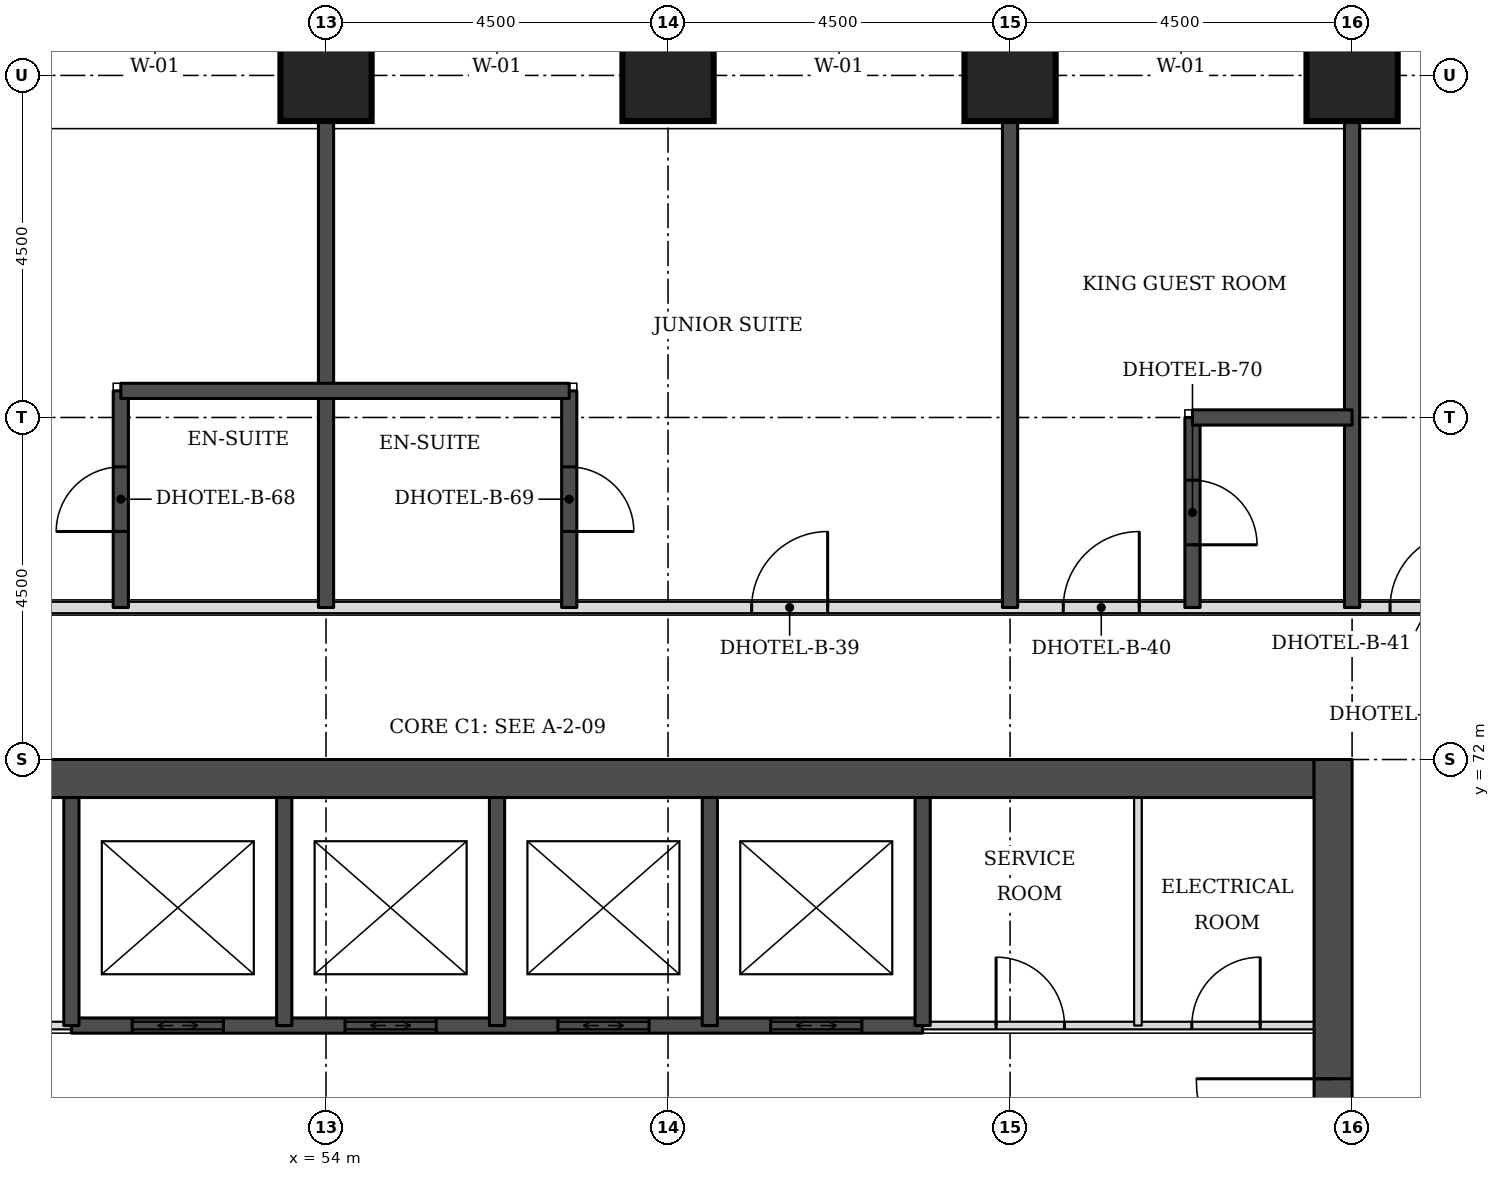
"""IFC4 building model, lengths in metres.
Left out: names, types, materials, properties, quantities, classifications, styles, units other than length and angle.
Written with IfcOpenShell. Run it as: python <this file> out.ifc"""

import sys

from ifc_helpers import new_model, si_unit, direction, frame, frame_2d, origin, origin_2d, place, context, subcontext, project, spatial, rectangle, extrude, element, fill, save


model = new_model("IFC4")
c1 = context("Model", 3, precision=1e-05, world=origin(), true_north=direction((0.0, 1.0)))
c2 = subcontext(c1, "Body", "Model", "MODEL_VIEW")
j1 = project(units=[si_unit("LENGTHUNIT", "METRE"), si_unit("PLANEANGLEUNIT", "RADIAN")], contexts=[c1])
p1 = place(None, origin())
s1 = spatial("IfcSite", under=j1, at=p1, CompositionType="ELEMENT")
p2 = place(p1, origin())
s2 = spatial("IfcBuilding", under=s1, at=p2, CompositionType="ELEMENT")
p3 = place(p2, frame((0.0, 0.0, 29.7)))
s3 = spatial("IfcBuildingStorey", under=s2, at=p3, CompositionType="ELEMENT", Elevation=29.7)
for number, where, z_axis, x_axis in (
    (1, (54.0, 81.0, 0.0), (0.0, 0.0, 1.0), (1.0, 0.0, 0.0)),
    (2, (58.5, 81.0, 0.0), (0.0, 0.0, 1.0), (1.0, 0.0, 0.0)),
    (3, (63.0, 81.0, 0.0), (0.0, 0.0, 1.0), (1.0, 0.0, 0.0)),
    (4, (67.5, 81.0, 0.0), (0.0, 0.0, 1.0), (1.0, 0.0, 0.0)),
):
    element("IfcColumn", number, at=place(p3, frame(where, z_axis=z_axis, x_axis=x_axis)), inside=s3, PredefinedType="COLUMN", context=c2, shape_type="SweptSolid", body=[
        extrude(rectangle(XDim=1.2, YDim=1.2, at=origin_2d()), origin(), (0.0, 0.0, 1.0), 3.3),
    ])
p4 = place(p3, frame((45.5, 71.75, 0.0), z_axis=(0.0, 0.0, 1.0), x_axis=(1.0, 0.0, 0.0)))
e5 = element("IfcWall", 5, at=p4, inside=s3, PredefinedType="SHEAR", context=c2, shape_type="SweptSolid", body=[
    extrude(rectangle(XDim=21.5, YDim=0.5, at=frame_2d((10.75, 0.0))), origin(), (0.0, 0.0, 1.0), 3.3),
])
p5 = place(p3, frame((67.25, 49.5, 0.0), z_axis=(0.0, 0.0, 1.0), x_axis=(0.0, 1.0, 0.0)))
e6 = element("IfcWall", 6, at=p5, inside=s3, PredefinedType="SHEAR", context=c2, shape_type="SweptSolid", body=[
    extrude(rectangle(XDim=22.5, YDim=0.5, at=frame_2d((11.25, 0.0))), origin(), (0.0, 0.0, 1.0), 3.3),
])
p6 = place(p5, frame((4.2, 0.0, 0.0)))
e7 = element("IfcOpeningElement", 7, at=p6, cuts=e6, PredefinedType="OPENING", context=c2, shape_type="SweptSolid", body=[
    extrude(rectangle(XDim=1.8, YDim=2.1, at=frame_2d((0.9, 1.05))), frame((0.0, 0.26, 0.0), z_axis=(0.0, -1.0, 0.0), x_axis=(1.0, 0.0, 0.0)), (0.0, 0.0, 1.0), 0.52),
])
p7 = place(p5, frame((6.9, 0.0, 0.0)))
e8 = element("IfcOpeningElement", 8, at=p7, cuts=e6, PredefinedType="OPENING", context=c2, shape_type="SweptSolid", body=[
    extrude(rectangle(XDim=1.1, YDim=2.1, at=frame_2d((0.55, 1.05))), frame((0.0, 0.26, 0.0), z_axis=(0.0, -1.0, 0.0), x_axis=(1.0, 0.0, 0.0)), (0.0, 0.0, 1.0), 0.52),
])
p8 = place(p5, frame((13.6, 0.0, 0.0)))
e9 = element("IfcOpeningElement", 9, at=p8, cuts=e6, PredefinedType="OPENING", context=c2, shape_type="SweptSolid", body=[
    extrude(rectangle(XDim=1.1, YDim=2.1, at=frame_2d((0.55, 1.05))), frame((0.0, 0.26, 0.0), z_axis=(0.0, -1.0, 0.0), x_axis=(1.0, 0.0, 0.0)), (0.0, 0.0, 1.0), 0.52),
])
p9 = place(p5, frame((16.5, 0.0, 0.0)))
e10 = element("IfcOpeningElement", 10, at=p9, cuts=e6, PredefinedType="OPENING", context=c2, shape_type="SweptSolid", body=[
    extrude(rectangle(XDim=1.8, YDim=2.1, at=frame_2d((0.9, 1.05))), frame((0.0, 0.26, 0.0), z_axis=(0.0, -1.0, 0.0), x_axis=(1.0, 0.0, 0.0)), (0.0, 0.0, 1.0), 0.52),
])
p10 = place(p3, frame((43.0, 74.0, 0.0), z_axis=(0.0, 0.0, 1.0), x_axis=(1.0, 0.0, 0.0)))
e11 = element("IfcWall", 11, at=p10, inside=s3, PredefinedType="PARTITIONING", context=c2, shape_type="SweptSolid", body=[
    extrude(rectangle(XDim=26.5, YDim=0.15, at=frame_2d((13.25, 0.0))), origin(), (0.0, 0.0, 1.0), 3.08),
])
p11 = place(p10, frame((4.65, 0.0, 0.0)))
e12 = element("IfcOpeningElement", 12, at=p11, cuts=e11, PredefinedType="OPENING", context=c2, shape_type="SweptSolid", body=[
    extrude(rectangle(XDim=1.0, YDim=2.1, at=frame_2d((0.5, 1.05))), frame((0.0, 0.085, 0.0), z_axis=(0.0, -1.0, 0.0), x_axis=(1.0, 0.0, 0.0)), (0.0, 0.0, 1.0), 0.17),
])
p12 = place(p10, frame((16.6, 0.0, 0.0)))
e13 = element("IfcOpeningElement", 13, at=p12, cuts=e11, PredefinedType="OPENING", context=c2, shape_type="SweptSolid", body=[
    extrude(rectangle(XDim=1.0, YDim=2.1, at=frame_2d((0.5, 1.05))), frame((0.0, 0.085, 0.0), z_axis=(0.0, -1.0, 0.0), x_axis=(1.0, 0.0, 0.0)), (0.0, 0.0, 1.0), 0.17),
])
p13 = place(p10, frame((20.7, 0.0, 0.0)))
e14 = element("IfcOpeningElement", 14, at=p13, cuts=e11, PredefinedType="OPENING", context=c2, shape_type="SweptSolid", body=[
    extrude(rectangle(XDim=1.0, YDim=2.1, at=frame_2d((0.5, 1.05))), frame((0.0, 0.085, 0.0), z_axis=(0.0, -1.0, 0.0), x_axis=(1.0, 0.0, 0.0)), (0.0, 0.0, 1.0), 0.17),
])
p14 = place(p10, frame((0.5, 0.0, 0.0)))
e15 = element("IfcOpeningElement", 15, at=p14, cuts=e11, PredefinedType="OPENING", context=c2, shape_type="SweptSolid", body=[
    extrude(rectangle(XDim=1.0, YDim=2.1, at=frame_2d((0.5, 1.05))), frame((0.0, 0.085, 0.0), z_axis=(0.0, -1.0, 0.0), x_axis=(1.0, 0.0, 0.0)), (0.0, 0.0, 1.0), 0.17),
])
p15 = place(p10, frame((25.0, 0.0, 0.0)))
e16 = element("IfcOpeningElement", 16, at=p15, cuts=e11, PredefinedType="OPENING", context=c2, shape_type="SweptSolid", body=[
    extrude(rectangle(XDim=1.0, YDim=2.1, at=frame_2d((0.5, 1.05))), frame((0.0, 0.085, 0.0), z_axis=(0.0, -1.0, 0.0), x_axis=(1.0, 0.0, 0.0)), (0.0, 0.0, 1.0), 0.17),
])
p16 = place(p3, frame((51.3, 74.0, 0.0), z_axis=(0.0, 0.0, 1.0), x_axis=(0.0, 1.0, 0.0)))
e17 = element("IfcWall", 17, at=p16, inside=s3, PredefinedType="SOLIDWALL", context=c2, shape_type="SweptSolid", body=[
    extrude(rectangle(XDim=2.85, YDim=0.2, at=frame_2d((1.425, 0.0))), origin(), (0.0, 0.0, 1.0), 3.08),
])
p17 = place(p16, frame((1.0, 0.0, 0.0)))
e18 = element("IfcOpeningElement", 18, at=p17, cuts=e17, PredefinedType="OPENING", context=c2, shape_type="SweptSolid", body=[
    extrude(rectangle(XDim=0.85, YDim=2.1, at=frame_2d((0.425, 1.05))), frame((0.0, 0.11, 0.0), z_axis=(0.0, -1.0, 0.0), x_axis=(1.0, 0.0, 0.0)), (0.0, 0.0, 1.0), 0.22),
])
p18 = place(p3, frame((54.0, 74.0, 0.0), z_axis=(0.0, 0.0, 1.0), x_axis=(0.0, 1.0, 0.0)))
e19 = element("IfcWall", 19, at=p18, inside=s3, PredefinedType="SOLIDWALL", context=c2, shape_type="SweptSolid", body=[
    extrude(rectangle(XDim=6.4, YDim=0.2, at=frame_2d((3.2, 0.0))), origin(), (0.0, 0.0, 1.0), 3.08),
])
p19 = place(p3, frame((57.2, 74.0, 0.0), z_axis=(0.0, 0.0, 1.0), x_axis=(0.0, 1.0, 0.0)))
e20 = element("IfcWall", 20, at=p19, inside=s3, PredefinedType="SOLIDWALL", context=c2, shape_type="SweptSolid", body=[
    extrude(rectangle(XDim=2.85, YDim=0.2, at=frame_2d((1.425, 0.0))), origin(), (0.0, 0.0, 1.0), 3.08),
])
p20 = place(p19, frame((1.0, 0.0, 0.0)))
e21 = element("IfcOpeningElement", 21, at=p20, cuts=e20, PredefinedType="OPENING", context=c2, shape_type="SweptSolid", body=[
    extrude(rectangle(XDim=0.85, YDim=2.1, at=frame_2d((0.425, 1.05))), frame((0.0, 0.11, 0.0), z_axis=(0.0, -1.0, 0.0), x_axis=(1.0, 0.0, 0.0)), (0.0, 0.0, 1.0), 0.22),
])
p21 = place(p3, frame((63.0, 74.0, 0.0), z_axis=(0.0, 0.0, 1.0), x_axis=(0.0, 1.0, 0.0)))
e22 = element("IfcWall", 22, at=p21, inside=s3, PredefinedType="SOLIDWALL", context=c2, shape_type="SweptSolid", body=[
    extrude(rectangle(XDim=6.4, YDim=0.2, at=frame_2d((3.2, 0.0))), origin(), (0.0, 0.0, 1.0), 3.08),
])
p22 = place(p3, frame((65.4, 74.0, 0.0), z_axis=(0.0, 0.0, 1.0), x_axis=(0.0, 1.0, 0.0)))
e23 = element("IfcWall", 23, at=p22, inside=s3, PredefinedType="SOLIDWALL", context=c2, shape_type="SweptSolid", body=[
    extrude(rectangle(XDim=2.5, YDim=0.2, at=frame_2d((1.25, 0.0))), origin(), (0.0, 0.0, 1.0), 3.08),
])
p23 = place(p22, frame((0.825, 0.0, 0.0)))
e24 = element("IfcOpeningElement", 24, at=p23, cuts=e23, PredefinedType="OPENING", context=c2, shape_type="SweptSolid", body=[
    extrude(rectangle(XDim=0.85, YDim=2.1, at=frame_2d((0.425, 1.05))), frame((0.0, 0.11, 0.0), z_axis=(0.0, -1.0, 0.0), x_axis=(1.0, 0.0, 0.0)), (0.0, 0.0, 1.0), 0.22),
])
p24 = place(p3, frame((67.5, 74.0, 0.0), z_axis=(0.0, 0.0, 1.0), x_axis=(0.0, 1.0, 0.0)))
e25 = element("IfcWall", 25, at=p24, inside=s3, PredefinedType="SOLIDWALL", context=c2, shape_type="SweptSolid", body=[
    extrude(rectangle(XDim=6.4, YDim=0.2, at=frame_2d((3.2, 0.0))), origin(), (0.0, 0.0, 1.0), 3.08),
])
p25 = place(p3, frame((65.4, 76.5, 0.0), z_axis=(0.0, 0.0, 1.0), x_axis=(1.0, 0.0, 0.0)))
e26 = element("IfcWall", 26, at=p25, inside=s3, PredefinedType="SOLIDWALL", context=c2, shape_type="SweptSolid", body=[
    extrude(rectangle(XDim=2.1, YDim=0.2, at=frame_2d((1.05, 0.0))), origin(), (0.0, 0.0, 1.0), 3.08),
])
p26 = place(p3, frame((51.3, 76.85, 0.0), z_axis=(0.0, 0.0, 1.0), x_axis=(1.0, 0.0, 0.0)))
e27 = element("IfcWall", 27, at=p26, inside=s3, PredefinedType="SOLIDWALL", context=c2, shape_type="SweptSolid", body=[
    extrude(rectangle(XDim=5.9, YDim=0.2, at=frame_2d((2.95, 0.0))), origin(), (0.0, 0.0, 1.0), 3.08),
])
p27 = place(p3, frame((45.5, 68.5, 0.0), z_axis=(0.0, 0.0, 1.0), x_axis=(1.0, 0.0, 0.0)))
e28 = element("IfcWall", 28, at=p27, inside=s3, PredefinedType="PARTITIONING", context=c2, shape_type="SweptSolid", body=[
    extrude(rectangle(XDim=5.15, YDim=0.1, at=frame_2d((2.575, 0.0))), origin(), (0.0, 0.0, 1.0), 3.08),
])
p28 = place(p27, frame((2.125, 0.0, 0.0)))
e29 = element("IfcOpeningElement", 29, at=p28, cuts=e28, PredefinedType="OPENING", context=c2, shape_type="SweptSolid", body=[
    extrude(rectangle(XDim=0.9, YDim=2.1, at=frame_2d((0.45, 1.05))), frame((0.0, 0.06, 0.0), z_axis=(0.0, -1.0, 0.0), x_axis=(1.0, 0.0, 0.0)), (0.0, 0.0, 1.0), 0.12),
])
p29 = place(p3, frame((61.85, 68.5, 0.0), z_axis=(0.0, 0.0, 1.0), x_axis=(1.0, 0.0, 0.0)))
e30 = element("IfcWall", 30, at=p29, inside=s3, PredefinedType="PARTITIONING", context=c2, shape_type="SweptSolid", body=[
    extrude(rectangle(XDim=5.15, YDim=0.1, at=frame_2d((2.575, 0.0))), origin(), (0.0, 0.0, 1.0), 3.08),
])
p30 = place(p29, frame((3.541, 0.0, 0.0)))
e31 = element("IfcOpeningElement", 31, at=p30, cuts=e30, PredefinedType="OPENING", context=c2, shape_type="SweptSolid", body=[
    extrude(rectangle(XDim=0.9, YDim=2.1, at=frame_2d((0.45, 1.05))), frame((0.0, 0.06, 0.0), z_axis=(0.0, -1.0, 0.0), x_axis=(1.0, 0.0, 0.0)), (0.0, 0.0, 1.0), 0.12),
])
p31 = place(p29, frame((0.966, 0.0, 0.0)))
e32 = element("IfcOpeningElement", 32, at=p31, cuts=e30, PredefinedType="OPENING", context=c2, shape_type="SweptSolid", body=[
    extrude(rectangle(XDim=0.9, YDim=2.1, at=frame_2d((0.45, 1.05))), frame((0.0, 0.06, 0.0), z_axis=(0.0, -1.0, 0.0), x_axis=(1.0, 0.0, 0.0)), (0.0, 0.0, 1.0), 0.12),
])
p32 = place(p3, frame((50.65, 68.5, 0.0), z_axis=(0.0, 0.0, 1.0), x_axis=(1.0, 0.0, 0.0)))
e33 = element("IfcWall", 33, at=p32, inside=s3, PredefinedType="SOLIDWALL", context=c2, shape_type="SweptSolid", body=[
    extrude(rectangle(XDim=11.2, YDim=0.2, at=frame_2d((5.6, 0.0))), origin(), (0.0, 0.0, 1.0), 3.08),
])
p33 = place(p32, frame((0.8, 0.0, 0.0)))
e34 = element("IfcOpeningElement", 34, at=p33, cuts=e33, PredefinedType="OPENING", context=c2, shape_type="SweptSolid", body=[
    extrude(rectangle(XDim=1.2, YDim=2.1, at=frame_2d((0.6, 1.05))), frame((0.0, 0.11, 0.0), z_axis=(0.0, -1.0, 0.0), x_axis=(1.0, 0.0, 0.0)), (0.0, 0.0, 1.0), 0.22),
])
p34 = place(p32, frame((3.6, 0.0, 0.0)))
e35 = element("IfcOpeningElement", 35, at=p34, cuts=e33, PredefinedType="OPENING", context=c2, shape_type="SweptSolid", body=[
    extrude(rectangle(XDim=1.2, YDim=2.1, at=frame_2d((0.6, 1.05))), frame((0.0, 0.11, 0.0), z_axis=(0.0, -1.0, 0.0), x_axis=(1.0, 0.0, 0.0)), (0.0, 0.0, 1.0), 0.22),
])
p35 = place(p32, frame((6.4, 0.0, 0.0)))
e36 = element("IfcOpeningElement", 36, at=p35, cuts=e33, PredefinedType="OPENING", context=c2, shape_type="SweptSolid", body=[
    extrude(rectangle(XDim=1.2, YDim=2.1, at=frame_2d((0.6, 1.05))), frame((0.0, 0.11, 0.0), z_axis=(0.0, -1.0, 0.0), x_axis=(1.0, 0.0, 0.0)), (0.0, 0.0, 1.0), 0.22),
])
p36 = place(p32, frame((9.2, 0.0, 0.0)))
e37 = element("IfcOpeningElement", 37, at=p36, cuts=e33, PredefinedType="OPENING", context=c2, shape_type="SweptSolid", body=[
    extrude(rectangle(XDim=1.2, YDim=2.1, at=frame_2d((0.6, 1.05))), frame((0.0, 0.11, 0.0), z_axis=(0.0, -1.0, 0.0), x_axis=(1.0, 0.0, 0.0)), (0.0, 0.0, 1.0), 0.22),
])
for number, where, z_axis, x_axis in (
    (38, (50.65, 68.5, 0.0), (0.0, 0.0, 1.0), (0.0, 1.0, 0.0)),
    (39, (53.45, 68.5, 0.0), (0.0, 0.0, 1.0), (0.0, 1.0, 0.0)),
    (40, (56.25, 68.5, 0.0), (0.0, 0.0, 1.0), (0.0, 1.0, 0.0)),
    (41, (59.05, 68.5, 0.0), (0.0, 0.0, 1.0), (0.0, 1.0, 0.0)),
    (42, (61.85, 68.5, 0.0), (0.0, 0.0, 1.0), (0.0, 1.0, 0.0)),
):
    element("IfcWall", number, at=place(p3, frame(where, z_axis=z_axis, x_axis=x_axis)), inside=s3, PredefinedType="SOLIDWALL", context=c2, shape_type="SweptSolid", body=[
        extrude(rectangle(XDim=3.0, YDim=0.2, at=frame_2d((1.5, 0.0))), origin(), (0.0, 0.0, 1.0), 3.08),
    ])
p37 = place(p3, frame((64.683, 68.5, 0.0), z_axis=(0.0, 0.0, 1.0), x_axis=(0.0, 1.0, 0.0)))
e43 = element("IfcWall", 43, at=p37, inside=s3, PredefinedType="PARTITIONING", context=c2, shape_type="SweptSolid", body=[
    extrude(rectangle(XDim=3.0, YDim=0.1, at=frame_2d((1.5, 0.0))), origin(), (0.0, 0.0, 1.0), 3.08),
])
p38 = place(p17, origin())
e44 = element("IfcDoor", 44, at=p38, inside=s3, OperationType="SINGLE_SWING_LEFT", PredefinedType="DOOR", context=c2, shape_type="SweptSolid", body=[
    extrude(rectangle(XDim=0.85, YDim=2.1, at=frame_2d((0.425, 1.05))), frame((0.0, 0.025, 0.0), z_axis=(0.0, -1.0, 0.0), x_axis=(1.0, 0.0, 0.0)), (0.0, 0.0, 1.0), 0.05),
])
fill(e18, e44)
p39 = place(p12, origin())
e45 = element("IfcDoor", 45, at=p39, inside=s3, OperationType="SINGLE_SWING_RIGHT", PredefinedType="DOOR", context=c2, shape_type="SweptSolid", body=[
    extrude(rectangle(XDim=1.0, YDim=2.1, at=frame_2d((0.5, 1.05))), frame((0.0, 0.025, 0.0), z_axis=(0.0, -1.0, 0.0), x_axis=(1.0, 0.0, 0.0)), (0.0, 0.0, 1.0), 0.05),
])
fill(e13, e45)
p40 = place(p20, frame((0.85, 0.0, 0.0), z_axis=(0.0, 0.0, 1.0), x_axis=(-1.0, 0.0, 0.0)))
e46 = element("IfcDoor", 46, at=p40, inside=s3, OperationType="SINGLE_SWING_RIGHT", PredefinedType="DOOR", context=c2, shape_type="SweptSolid", body=[
    extrude(rectangle(XDim=0.85, YDim=2.1, at=frame_2d((0.425, 1.05))), frame((0.0, 0.025, 0.0), z_axis=(0.0, -1.0, 0.0), x_axis=(1.0, 0.0, 0.0)), (0.0, 0.0, 1.0), 0.05),
])
fill(e21, e46)
p41 = place(p13, origin())
e47 = element("IfcDoor", 47, at=p41, inside=s3, OperationType="SINGLE_SWING_RIGHT", PredefinedType="DOOR", context=c2, shape_type="SweptSolid", body=[
    extrude(rectangle(XDim=1.0, YDim=2.1, at=frame_2d((0.5, 1.05))), frame((0.0, 0.025, 0.0), z_axis=(0.0, -1.0, 0.0), x_axis=(1.0, 0.0, 0.0)), (0.0, 0.0, 1.0), 0.05),
])
fill(e14, e47)
p42 = place(p23, frame((0.85, 0.0, 0.0), z_axis=(0.0, 0.0, 1.0), x_axis=(-1.0, 0.0, 0.0)))
e48 = element("IfcDoor", 48, at=p42, inside=s3, OperationType="SINGLE_SWING_RIGHT", PredefinedType="DOOR", context=c2, shape_type="SweptSolid", body=[
    extrude(rectangle(XDim=0.85, YDim=2.1, at=frame_2d((0.425, 1.05))), frame((0.0, 0.025, 0.0), z_axis=(0.0, -1.0, 0.0), x_axis=(1.0, 0.0, 0.0)), (0.0, 0.0, 1.0), 0.05),
])
fill(e24, e48)
p43 = place(p15, origin())
e49 = element("IfcDoor", 49, at=p43, inside=s3, OperationType="SINGLE_SWING_RIGHT", PredefinedType="DOOR", context=c2, shape_type="SweptSolid", body=[
    extrude(rectangle(XDim=1.0, YDim=2.1, at=frame_2d((0.5, 1.05))), frame((0.0, 0.025, 0.0), z_axis=(0.0, -1.0, 0.0), x_axis=(1.0, 0.0, 0.0)), (0.0, 0.0, 1.0), 0.05),
])
fill(e16, e49)
p44 = place(p33, origin())
e50 = element("IfcDoor", 50, at=p44, inside=s3, OperationType="DOUBLE_DOOR_SLIDING", PredefinedType="DOOR", context=c2, shape_type="SweptSolid", body=[
    extrude(rectangle(XDim=1.2, YDim=2.1, at=frame_2d((0.6, 1.05))), frame((0.0, 0.025, 0.0), z_axis=(0.0, -1.0, 0.0), x_axis=(1.0, 0.0, 0.0)), (0.0, 0.0, 1.0), 0.05),
])
fill(e34, e50)
p45 = place(p34, origin())
e51 = element("IfcDoor", 51, at=p45, inside=s3, OperationType="DOUBLE_DOOR_SLIDING", PredefinedType="DOOR", context=c2, shape_type="SweptSolid", body=[
    extrude(rectangle(XDim=1.2, YDim=2.1, at=frame_2d((0.6, 1.05))), frame((0.0, 0.025, 0.0), z_axis=(0.0, -1.0, 0.0), x_axis=(1.0, 0.0, 0.0)), (0.0, 0.0, 1.0), 0.05),
])
fill(e35, e51)
p46 = place(p35, origin())
e52 = element("IfcDoor", 52, at=p46, inside=s3, OperationType="DOUBLE_DOOR_SLIDING", PredefinedType="DOOR", context=c2, shape_type="SweptSolid", body=[
    extrude(rectangle(XDim=1.2, YDim=2.1, at=frame_2d((0.6, 1.05))), frame((0.0, 0.025, 0.0), z_axis=(0.0, -1.0, 0.0), x_axis=(1.0, 0.0, 0.0)), (0.0, 0.0, 1.0), 0.05),
])
fill(e36, e52)
p47 = place(p36, origin())
e53 = element("IfcDoor", 53, at=p47, inside=s3, OperationType="DOUBLE_DOOR_SLIDING", PredefinedType="DOOR", context=c2, shape_type="SweptSolid", body=[
    extrude(rectangle(XDim=1.2, YDim=2.1, at=frame_2d((0.6, 1.05))), frame((0.0, 0.025, 0.0), z_axis=(0.0, -1.0, 0.0), x_axis=(1.0, 0.0, 0.0)), (0.0, 0.0, 1.0), 0.05),
])
fill(e37, e53)
p48 = place(p9, origin())
e54 = element("IfcDoor", 54, at=p48, inside=s3, OperationType="SINGLE_SWING_RIGHT", PredefinedType="DOOR", context=c2, shape_type="SweptSolid", body=[
    extrude(rectangle(XDim=1.8, YDim=2.1, at=frame_2d((0.9, 1.05))), frame((0.0, 0.025, 0.0), z_axis=(0.0, -1.0, 0.0), x_axis=(1.0, 0.0, 0.0)), (0.0, 0.0, 1.0), 0.05),
])
fill(e10, e54)
p49 = place(p30, origin())
e55 = element("IfcDoor", 55, at=p49, inside=s3, OperationType="SINGLE_SWING_RIGHT", PredefinedType="DOOR", context=c2, shape_type="SweptSolid", body=[
    extrude(rectangle(XDim=0.9, YDim=2.1, at=frame_2d((0.45, 1.05))), frame((0.0, 0.025, 0.0), z_axis=(0.0, -1.0, 0.0), x_axis=(1.0, 0.0, 0.0)), (0.0, 0.0, 1.0), 0.05),
])
fill(e31, e55)
p50 = place(p31, origin())
e56 = element("IfcDoor", 56, at=p50, inside=s3, OperationType="SINGLE_SWING_LEFT", PredefinedType="DOOR", context=c2, shape_type="SweptSolid", body=[
    extrude(rectangle(XDim=0.9, YDim=2.1, at=frame_2d((0.45, 1.05))), frame((0.0, 0.025, 0.0), z_axis=(0.0, -1.0, 0.0), x_axis=(1.0, 0.0, 0.0)), (0.0, 0.0, 1.0), 0.05),
])
fill(e32, e56)
save(model, sys.argv[1])
